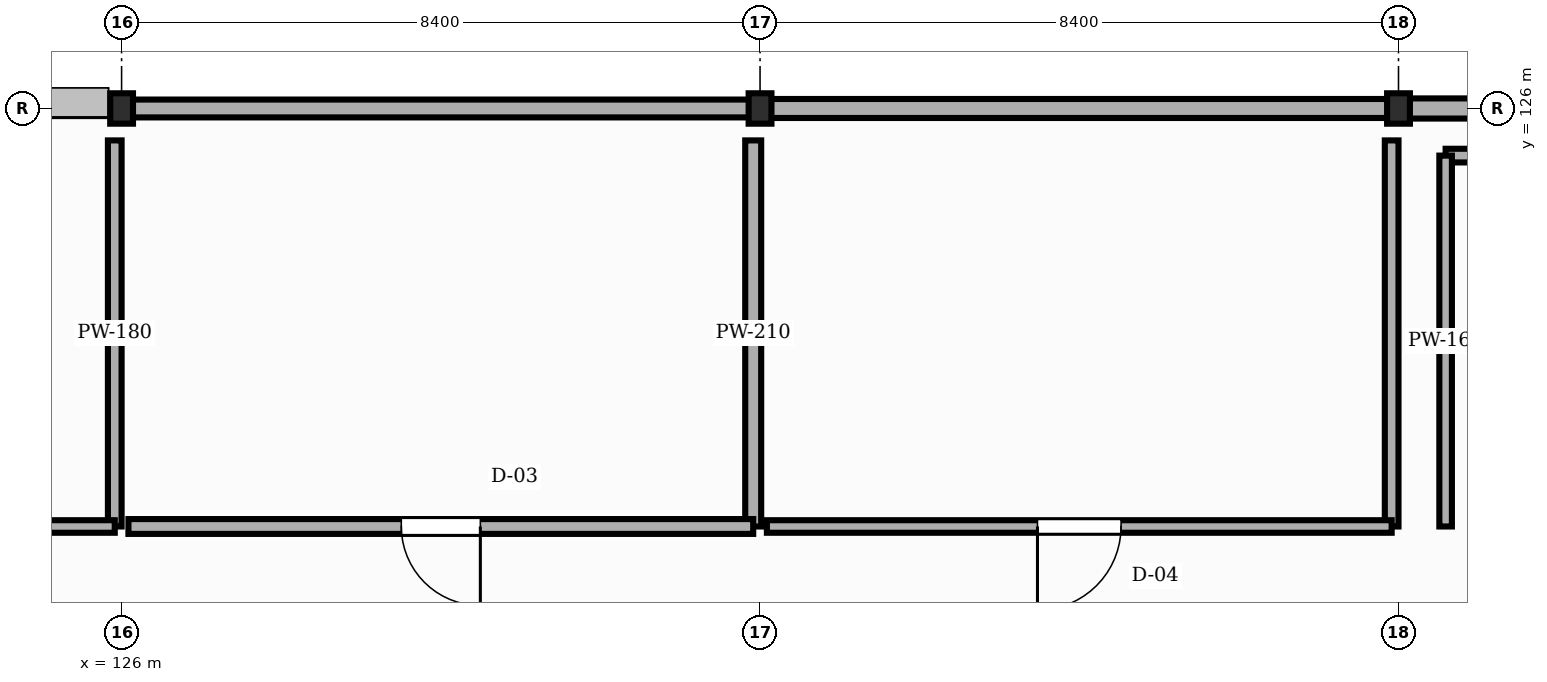
"""IFC4 building model, lengths in metres.
Left out: names, types, materials, properties, quantities, classifications, styles, units other than length and angle.
Written with IfcOpenShell. Run it as: python <this file> out.ifc"""

import sys

from ifc_helpers import new_model, si_unit, direction, frame, frame_2d, origin, origin_2d, place, context, subcontext, project, spatial, rectangle, i_section, extrude, element, fill, save


model = new_model("IFC4")
c1 = context("Model", 3, precision=1e-05, world=origin(), true_north=direction((0.0, 1.0)))
c2 = subcontext(c1, "Body", "Model", "MODEL_VIEW")
j1 = project(units=[si_unit("LENGTHUNIT", "METRE"), si_unit("PLANEANGLEUNIT", "RADIAN")], contexts=[c1])
p1 = place(None, origin())
s1 = spatial("IfcSite", under=j1, at=p1, CompositionType="ELEMENT")
p2 = place(p1, origin())
s2 = spatial("IfcBuilding", under=s1, at=p2, CompositionType="ELEMENT")
p3 = place(p2, frame((0.0, 0.0, 22.05)))
s3 = spatial("IfcBuildingStorey", under=s2, at=p3, CompositionType="ELEMENT", Elevation=22.05)
for number, where, z_axis, x_axis in (
    (1, (126.0, 126.0, 0.0), (0.0, 0.0, 1.0), (1.0, 0.0, 0.0)),
    (2, (134.4, 126.0, 0.0), (0.0, 0.0, 1.0), (1.0, 0.0, 0.0)),
    (3, (142.8, 126.0, 0.0), (0.0, 0.0, 1.0), (1.0, 0.0, 0.0)),
):
    element("IfcColumn", number, at=place(p3, frame(where, z_axis=z_axis, x_axis=x_axis)), inside=s3, PredefinedType="COLUMN", context=c2, shape_type="SweptSolid", body=[
        extrude(i_section(OverallWidth=0.3, OverallDepth=0.4, WebThickness=0.013, FlangeThickness=0.024, FilletRadius=0.027, at=origin_2d()), origin(), (0.0, 0.0, 1.0), 4.05),
    ])
p4 = place(p3, frame((151.192, 126.0, 0.0), z_axis=(0.0, 0.0, 1.0), x_axis=(-1.0, 0.0, 0.0)))
e4 = element("IfcWall", 4, at=p4, inside=s3, PredefinedType="STANDARD", context=c2, shape_type="SweptSolid", body=[
    extrude(rectangle(XDim=8.384, YDim=0.265, at=frame_2d((4.192, 0.0))), origin(), (0.0, 0.0, 1.0), 3.497),
])
p5 = place(p3, frame((142.792, 126.0, 0.0), z_axis=(0.0, 0.0, 1.0), x_axis=(-1.0, 0.0, 0.0)))
e5 = element("IfcWall", 5, at=p5, inside=s3, PredefinedType="STANDARD", context=c2, shape_type="SweptSolid", body=[
    extrude(rectangle(XDim=8.384, YDim=0.25, at=frame_2d((4.192, 0.0))), origin(), (0.0, 0.0, 1.0), 3.527),
])
p6 = place(p3, frame((134.392, 126.0, 0.0), z_axis=(0.0, 0.0, 1.0), x_axis=(-1.0, 0.0, 0.0)))
e6 = element("IfcWall", 6, at=p6, inside=s3, PredefinedType="STANDARD", context=c2, shape_type="SweptSolid", body=[
    extrude(rectangle(XDim=8.384, YDim=0.235, at=frame_2d((4.192, 0.0))), origin(), (0.0, 0.0, 1.0), 3.497),
])
p7 = place(p3, frame((125.91, 125.58, -0.004), z_axis=(0.0, 0.0, 1.0), x_axis=(0.0, -1.0, 0.0)))
e7 = element("IfcWall", 7, at=p7, inside=s3, PredefinedType="STANDARD", context=c2, shape_type="SweptSolid", body=[
    extrude(rectangle(XDim=5.08, YDim=0.18, at=frame_2d((2.54, 0.0))), origin(), (0.0, 0.0, 1.0), 3.371),
])
p8 = place(p3, frame((125.91, 120.5, -0.004), z_axis=(0.0, 0.0, 1.0), x_axis=(-1.0, 0.0, 0.0)))
e8 = element("IfcWall", 8, at=p8, inside=s3, PredefinedType="STANDARD", context=c2, shape_type="SweptSolid", body=[
    extrude(rectangle(XDim=8.22, YDim=0.165, at=frame_2d((4.11, 0.0))), origin(), (0.0, 0.0, 1.0), 3.854),
])
p9 = place(p8, frame((3.62, 0.0, 0.0)))
e9 = element("IfcOpeningElement", 9, at=p9, cuts=e8, PredefinedType="OPENING", context=c2, shape_type="SweptSolid", body=[
    extrude(rectangle(XDim=0.98, YDim=2.06, at=frame_2d((0.49, 1.03))), frame((0.0, 0.093, 0.0), z_axis=(0.0, -1.0, 0.0), x_axis=(1.0, 0.0, 0.0)), (0.0, 0.0, 1.0), 0.185),
])
p10 = place(p3, frame((134.31, 125.58, -0.004), z_axis=(0.0, 0.0, 1.0), x_axis=(0.0, -1.0, 0.0)))
e10 = element("IfcWall", 10, at=p10, inside=s3, PredefinedType="STANDARD", context=c2, shape_type="SweptSolid", body=[
    extrude(rectangle(XDim=5.08, YDim=0.21, at=frame_2d((2.54, 0.0))), origin(), (0.0, 0.0, 1.0), 3.461),
])
p11 = place(p3, frame((134.31, 120.5, -0.004), z_axis=(0.0, 0.0, 1.0), x_axis=(-1.0, 0.0, 0.0)))
e11 = element("IfcWall", 11, at=p11, inside=s3, PredefinedType="STANDARD", context=c2, shape_type="SweptSolid", body=[
    extrude(rectangle(XDim=8.22, YDim=0.195, at=frame_2d((4.11, 0.0))), origin(), (0.0, 0.0, 1.0), 3.854),
])
p12 = place(p11, frame((3.59, 0.0, 0.0)))
e12 = element("IfcOpeningElement", 12, at=p12, cuts=e11, PredefinedType="OPENING", context=c2, shape_type="SweptSolid", body=[
    extrude(rectangle(XDim=1.04, YDim=2.06, at=frame_2d((0.52, 1.03))), frame((0.0, 0.107, 0.0), z_axis=(0.0, -1.0, 0.0), x_axis=(1.0, 0.0, 0.0)), (0.0, 0.0, 1.0), 0.215),
])
p13 = place(p3, frame((142.71, 125.58, -0.004), z_axis=(0.0, 0.0, 1.0), x_axis=(0.0, -1.0, 0.0)))
e13 = element("IfcWall", 13, at=p13, inside=s3, PredefinedType="STANDARD", context=c2, shape_type="SweptSolid", body=[
    extrude(rectangle(XDim=5.08, YDim=0.18, at=frame_2d((2.54, 0.0))), origin(), (0.0, 0.0, 1.0), 3.511),
])
p14 = place(p3, frame((142.71, 120.5, -0.004), z_axis=(0.0, 0.0, 1.0), x_axis=(-1.0, 0.0, 0.0)))
e14 = element("IfcWall", 14, at=p14, inside=s3, PredefinedType="STANDARD", context=c2, shape_type="SweptSolid", body=[
    extrude(rectangle(XDim=8.22, YDim=0.165, at=frame_2d((4.11, 0.0))), origin(), (0.0, 0.0, 1.0), 3.854),
])
p15 = place(p14, frame((3.56, 0.0, 0.0)))
e15 = element("IfcOpeningElement", 15, at=p15, cuts=e14, PredefinedType="OPENING", context=c2, shape_type="SweptSolid", body=[
    extrude(rectangle(XDim=1.1, YDim=2.06, at=frame_2d((0.55, 1.03))), frame((0.0, 0.093, 0.0), z_axis=(0.0, -1.0, 0.0), x_axis=(1.0, 0.0, 0.0)), (0.0, 0.0, 1.0), 0.185),
])
p16 = place(p3, frame((145.7, 125.38, -0.004), z_axis=(0.0, 0.0, 1.0), x_axis=(-1.0, 0.0, 0.0)))
e16 = element("IfcWall", 16, at=p16, inside=s3, PredefinedType="STANDARD", context=c2, shape_type="SweptSolid", body=[
    extrude(rectangle(XDim=2.28, YDim=0.18, at=frame_2d((1.14, 0.0))), origin(), (0.0, 0.0, 1.0), 3.854),
])
p17 = place(p3, frame((143.42, 125.38, -0.004), z_axis=(0.0, 0.0, 1.0), x_axis=(0.0, -1.0, 0.0)))
e17 = element("IfcWall", 17, at=p17, inside=s3, PredefinedType="STANDARD", context=c2, shape_type="SweptSolid", body=[
    extrude(rectangle(XDim=4.88, YDim=0.165, at=frame_2d((2.44, 0.0))), origin(), (0.0, 0.0, 1.0), 3.854),
])
p18 = place(p12, origin())
e18 = element("IfcDoor", 18, at=p18, inside=s3, OperationType="SINGLE_SWING_LEFT", PredefinedType="DOOR", context=c2, shape_type="SweptSolid", body=[
    extrude(rectangle(XDim=1.04, YDim=2.06, at=frame_2d((0.52, 1.03))), frame((0.0, 0.025, 0.0), z_axis=(0.0, -1.0, 0.0), x_axis=(1.0, 0.0, 0.0)), (0.0, 0.0, 1.0), 0.05),
])
fill(e12, e18)
p19 = place(p15, origin())
e19 = element("IfcDoor", 19, at=p19, inside=s3, OperationType="SINGLE_SWING_RIGHT", PredefinedType="DOOR", context=c2, shape_type="SweptSolid", body=[
    extrude(rectangle(XDim=1.1, YDim=2.06, at=frame_2d((0.55, 1.03))), frame((0.0, 0.025, 0.0), z_axis=(0.0, -1.0, 0.0), x_axis=(1.0, 0.0, 0.0)), (0.0, 0.0, 1.0), 0.05),
])
fill(e15, e19)
save(model, sys.argv[1])
